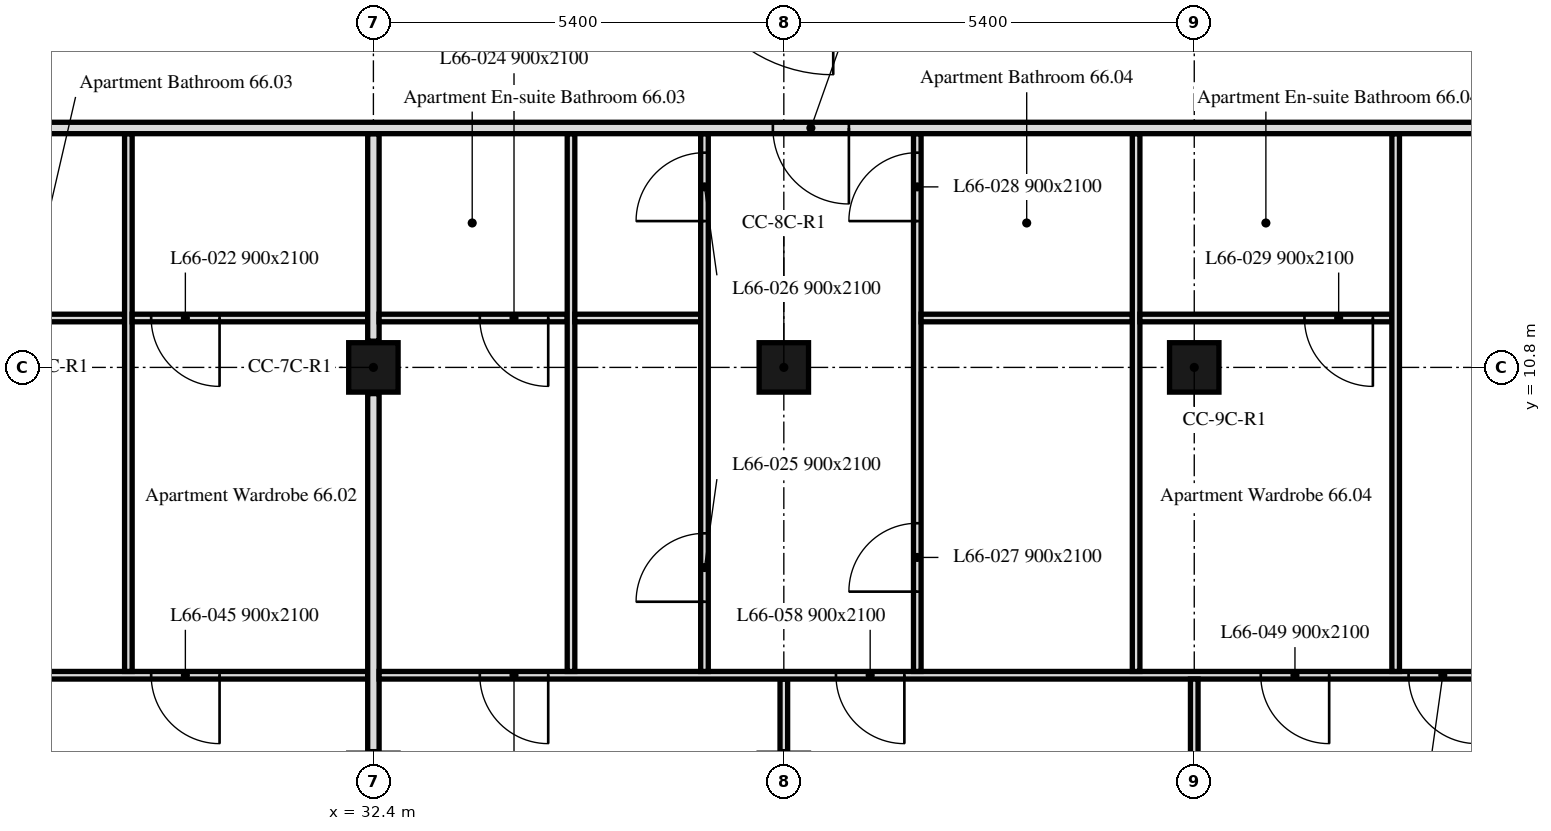
"""IFC4 building model, lengths in metres.
Left out: names, types, materials, properties, quantities, classifications, styles, units other than length and angle.
Written with IfcOpenShell. Run it as: python <this file> out.ifc"""

import sys

from ifc_helpers import new_model, si_unit, direction, frame, frame_2d, origin, origin_2d, place, context, subcontext, project, spatial, rectangle, extrude, element, fill, save


model = new_model("IFC4")
c1 = context("Model", 3, precision=1e-05, world=origin(), true_north=direction((0.0, 1.0)))
c2 = subcontext(c1, "Body", "Model", "MODEL_VIEW")
j1 = project(units=[si_unit("LENGTHUNIT", "METRE"), si_unit("PLANEANGLEUNIT", "RADIAN")], contexts=[c1])
p1 = place(None, origin())
s1 = spatial("IfcSite", under=j1, at=p1, CompositionType="ELEMENT")
p2 = place(p1, origin())
s2 = spatial("IfcBuilding", under=s1, at=p2, CompositionType="ELEMENT")
p3 = place(p2, frame((0.0, 0.0, 271.9)))
s3 = spatial("IfcBuildingStorey", under=s2, at=p3, CompositionType="ELEMENT", Elevation=271.9)
for number, where, z_axis, x_axis in (
    (1, (32.4, 10.8, 0.0), (0.0, 0.0, 1.0), (1.0, 0.0, 0.0)),
    (2, (37.8, 10.8, 0.0), (0.0, 0.0, 1.0), (1.0, 0.0, 0.0)),
    (3, (43.2, 10.8, 0.0), (0.0, 0.0, 1.0), (1.0, 0.0, 0.0)),
):
    element("IfcColumn", number, at=place(p3, frame(where, z_axis=z_axis, x_axis=x_axis)), inside=s3, PredefinedType="COLUMN", context=c2, shape_type="SweptSolid", body=[
        extrude(rectangle(XDim=0.65, YDim=0.65, at=origin_2d()), origin(), (0.0, 0.0, 1.0), 3.0),
    ])
p4 = place(p3, frame((32.325, 6.75, 0.0), z_axis=(0.0, 0.0, 1.0), x_axis=(-1.0, 0.0, 0.0)))
e4 = element("IfcWall", 4, at=p4, inside=s3, PredefinedType="PARTITIONING", context=c2, shape_type="SweptSolid", body=[
    extrude(rectangle(XDim=5.355, YDim=0.1, at=frame_2d((2.677, 0.0))), origin(), (0.0, 0.0, 1.0), 3.0),
])
p5 = place(p4, frame((1.949, 0.0, 0.0)))
e5 = element("IfcOpeningElement", 5, at=p5, cuts=e4, PredefinedType="OPENING", context=c2, shape_type="SweptSolid", body=[
    extrude(rectangle(XDim=0.9, YDim=2.1, at=frame_2d((0.45, 1.05))), frame((0.0, 0.05, 0.0), z_axis=(0.0, -1.0, 0.0), x_axis=(1.0, 0.0, 0.0)), (0.0, 0.0, 1.0), 0.1),
])
p6 = place(p3, frame((29.126, 11.45, 0.0), z_axis=(0.0, 0.0, 1.0), x_axis=(-1.0, 0.0, 0.0)))
e6 = element("IfcWall", 6, at=p6, inside=s3, PredefinedType="PARTITIONING", context=c2, shape_type="SweptSolid", body=[
    extrude(rectangle(XDim=2.056, YDim=0.1, at=frame_2d((1.028, 0.0))), origin(), (0.0, 0.0, 1.0), 3.0),
])
p7 = place(p3, frame((29.176, 6.8, 0.0), z_axis=(0.0, 0.0, 1.0), x_axis=(0.0, 1.0, 0.0)))
e7 = element("IfcWall", 7, at=p7, inside=s3, PredefinedType="PARTITIONING", context=c2, shape_type="SweptSolid", body=[
    extrude(rectangle(XDim=7.075, YDim=0.1, at=frame_2d((3.538, 0.0))), origin(), (0.0, 0.0, 1.0), 3.0),
])
p8 = place(p3, frame((32.4, 5.745, 0.0), z_axis=(0.0, 0.0, 1.0), x_axis=(0.0, 1.0, 0.0)))
e8 = element("IfcWall", 8, at=p8, inside=s3, PredefinedType="PARTITIONING", context=c2, shape_type="SweptSolid", body=[
    extrude(rectangle(XDim=4.71, YDim=0.15, at=frame_2d((2.355, 0.0))), origin(), (0.0, 0.0, 1.0), 2.4),
])
p9 = place(p3, frame((32.325, 11.45, 0.0), z_axis=(0.0, 0.0, 1.0), x_axis=(-1.0, 0.0, 0.0)))
e9 = element("IfcWall", 9, at=p9, inside=s3, PredefinedType="PARTITIONING", context=c2, shape_type="SweptSolid", body=[
    extrude(rectangle(XDim=3.099, YDim=0.1, at=frame_2d((1.549, 0.0))), origin(), (0.0, 0.0, 1.0), 3.0),
])
p10 = place(p9, frame((1.949, 0.0, 0.0)))
e10 = element("IfcOpeningElement", 10, at=p10, cuts=e9, PredefinedType="OPENING", context=c2, shape_type="SweptSolid", body=[
    extrude(rectangle(XDim=0.9, YDim=2.1, at=frame_2d((0.45, 1.05))), frame((0.0, 0.05, 0.0), z_axis=(0.0, -1.0, 0.0), x_axis=(1.0, 0.0, 0.0)), (0.0, 0.0, 1.0), 0.1),
])
p11 = place(p3, frame((32.4, 11.145, 0.0), z_axis=(0.0, 0.0, 1.0), x_axis=(0.0, 1.0, 0.0)))
e11 = element("IfcWall", 11, at=p11, inside=s3, PredefinedType="PARTITIONING", context=c2, shape_type="SweptSolid", body=[
    extrude(rectangle(XDim=2.73, YDim=0.15, at=frame_2d((1.365, 0.0))), origin(), (0.0, 0.0, 1.0), 2.4),
])
p12 = place(p3, frame((37.8, 5.745, 0.0), z_axis=(0.0, 0.0, 1.0), x_axis=(0.0, 1.0, 0.0)))
e12 = element("IfcWall", 12, at=p12, inside=s3, PredefinedType="PARTITIONING", context=c2, shape_type="SweptSolid", body=[
    extrude(rectangle(XDim=0.955, YDim=0.1, at=frame_2d((0.478, 0.0))), origin(), (0.0, 0.0, 1.0), 2.4),
])
p13 = place(p3, frame((47.849, 6.75, 0.0), z_axis=(0.0, 0.0, 1.0), x_axis=(-1.0, 0.0, 0.0)))
e13 = element("IfcWall", 13, at=p13, inside=s3, PredefinedType="PARTITIONING", context=c2, shape_type="SweptSolid", body=[
    extrude(rectangle(XDim=15.374, YDim=0.1, at=frame_2d((7.687, 0.0))), origin(), (0.0, 0.0, 1.0), 2.4),
])
p14 = place(p13, frame((0.929, 0.0, 0.0)))
e14 = element("IfcOpeningElement", 14, at=p14, cuts=e13, PredefinedType="OPENING", context=c2, shape_type="SweptSolid", body=[
    extrude(rectangle(XDim=0.9, YDim=2.1, at=frame_2d((0.45, 1.05))), frame((0.0, 0.05, 0.0), z_axis=(0.0, -1.0, 0.0), x_axis=(1.0, 0.0, 0.0)), (0.0, 0.0, 1.0), 0.1),
])
p15 = place(p13, frame((13.149, 0.0, 0.0)))
e15 = element("IfcOpeningElement", 15, at=p15, cuts=e13, PredefinedType="OPENING", context=c2, shape_type="SweptSolid", body=[
    extrude(rectangle(XDim=0.9, YDim=2.1, at=frame_2d((0.45, 1.05))), frame((0.0, 0.05, 0.0), z_axis=(0.0, -1.0, 0.0), x_axis=(1.0, 0.0, 0.0)), (0.0, 0.0, 1.0), 0.1),
])
p16 = place(p13, frame((2.874, 0.0, 0.0)))
e16 = element("IfcOpeningElement", 16, at=p16, cuts=e13, PredefinedType="OPENING", context=c2, shape_type="SweptSolid", body=[
    extrude(rectangle(XDim=0.9, YDim=2.1, at=frame_2d((0.45, 1.05))), frame((0.0, 0.05, 0.0), z_axis=(0.0, -1.0, 0.0), x_axis=(1.0, 0.0, 0.0)), (0.0, 0.0, 1.0), 0.1),
])
p17 = place(p13, frame((8.463, 0.0, 0.0)))
e17 = element("IfcOpeningElement", 17, at=p17, cuts=e13, PredefinedType="OPENING", context=c2, shape_type="SweptSolid", body=[
    extrude(rectangle(XDim=0.9, YDim=2.1, at=frame_2d((0.45, 1.05))), frame((0.0, 0.05, 0.0), z_axis=(0.0, -1.0, 0.0), x_axis=(1.0, 0.0, 0.0)), (0.0, 0.0, 1.0), 0.1),
])
p18 = place(p3, frame((43.2, 1.112, 0.0), z_axis=(0.0, 0.0, 1.0), x_axis=(0.0, 1.0, 0.0)))
e18 = element("IfcWall", 18, at=p18, inside=s3, PredefinedType="PARTITIONING", context=c2, shape_type="SweptSolid", body=[
    extrude(rectangle(XDim=5.588, YDim=0.1, at=frame_2d((2.794, 0.0))), origin(), (0.0, 0.0, 1.0), 3.0),
])
p19 = place(p18, frame((1.813, 0.0, 0.0)))
e19 = element("IfcOpeningElement", 19, at=p19, cuts=e18, PredefinedType="OPENING", context=c2, shape_type="SweptSolid", body=[
    extrude(rectangle(XDim=0.9, YDim=2.1, at=frame_2d((0.45, 1.05))), frame((0.0, 0.05, 0.0), z_axis=(0.0, -1.0, 0.0), x_axis=(1.0, 0.0, 0.0)), (0.0, 0.0, 1.0), 0.1),
])
p20 = place(p3, frame((34.95, 11.45, 0.0), z_axis=(0.0, 0.0, 1.0), x_axis=(-1.0, 0.0, 0.0)))
e20 = element("IfcWall", 20, at=p20, inside=s3, PredefinedType="PARTITIONING", context=c2, shape_type="SweptSolid", body=[
    extrude(rectangle(XDim=2.475, YDim=0.1, at=frame_2d((1.237, 0.0))), origin(), (0.0, 0.0, 1.0), 3.0),
])
p21 = place(p20, frame((0.25, 0.0, 0.0)))
e21 = element("IfcOpeningElement", 21, at=p21, cuts=e20, PredefinedType="OPENING", context=c2, shape_type="SweptSolid", body=[
    extrude(rectangle(XDim=0.9, YDim=2.1, at=frame_2d((0.45, 1.05))), frame((0.0, 0.05, 0.0), z_axis=(0.0, -1.0, 0.0), x_axis=(1.0, 0.0, 0.0)), (0.0, 0.0, 1.0), 0.1),
])
p22 = place(p3, frame((35.0, 6.8, 0.0), z_axis=(0.0, 0.0, 1.0), x_axis=(0.0, 1.0, 0.0)))
e22 = element("IfcWall", 22, at=p22, inside=s3, PredefinedType="PARTITIONING", context=c2, shape_type="SweptSolid", body=[
    extrude(rectangle(XDim=7.075, YDim=0.1, at=frame_2d((3.538, 0.0))), origin(), (0.0, 0.0, 1.0), 2.4),
])
p23 = place(p3, frame((36.706, 11.45, 0.0), z_axis=(0.0, 0.0, 1.0), x_axis=(-1.0, 0.0, 0.0)))
e23 = element("IfcWall", 23, at=p23, inside=s3, PredefinedType="PARTITIONING", context=c2, shape_type="SweptSolid", body=[
    extrude(rectangle(XDim=1.656, YDim=0.1, at=frame_2d((0.828, 0.0))), origin(), (0.0, 0.0, 1.0), 3.0),
])
p24 = place(p3, frame((36.756, 6.8, 0.0), z_axis=(0.0, 0.0, 1.0), x_axis=(0.0, 1.0, 0.0)))
e24 = element("IfcWall", 24, at=p24, inside=s3, PredefinedType="PARTITIONING", context=c2, shape_type="SweptSolid", body=[
    extrude(rectangle(XDim=7.075, YDim=0.1, at=frame_2d((3.538, 0.0))), origin(), (0.0, 0.0, 1.0), 2.4),
])
p25 = place(p24, frame((0.917, 0.0, 0.0)))
e25 = element("IfcOpeningElement", 25, at=p25, cuts=e24, PredefinedType="OPENING", context=c2, shape_type="SweptSolid", body=[
    extrude(rectangle(XDim=0.9, YDim=2.1, at=frame_2d((0.45, 1.05))), frame((0.0, 0.05, 0.0), z_axis=(0.0, -1.0, 0.0), x_axis=(1.0, 0.0, 0.0)), (0.0, 0.0, 1.0), 0.1),
])
p26 = place(p24, frame((5.925, 0.0, 0.0)))
e26 = element("IfcOpeningElement", 26, at=p26, cuts=e24, PredefinedType="OPENING", context=c2, shape_type="SweptSolid", body=[
    extrude(rectangle(XDim=0.9, YDim=2.1, at=frame_2d((0.45, 1.05))), frame((0.0, 0.05, 0.0), z_axis=(0.0, -1.0, 0.0), x_axis=(1.0, 0.0, 0.0)), (0.0, 0.0, 1.0), 0.1),
])
p27 = place(p3, frame((39.556, 6.8, 0.0), z_axis=(0.0, 0.0, 1.0), x_axis=(0.0, 1.0, 0.0)))
e27 = element("IfcWall", 27, at=p27, inside=s3, PredefinedType="PARTITIONING", context=c2, shape_type="SweptSolid", body=[
    extrude(rectangle(XDim=7.075, YDim=0.1, at=frame_2d((3.538, 0.0))), origin(), (0.0, 0.0, 1.0), 2.4),
])
p28 = place(p27, frame((1.05, 0.0, 0.0)))
e28 = element("IfcOpeningElement", 28, at=p28, cuts=e27, PredefinedType="OPENING", context=c2, shape_type="SweptSolid", body=[
    extrude(rectangle(XDim=0.9, YDim=2.1, at=frame_2d((0.45, 1.05))), frame((0.0, 0.05, 0.0), z_axis=(0.0, -1.0, 0.0), x_axis=(1.0, 0.0, 0.0)), (0.0, 0.0, 1.0), 0.1),
])
p29 = place(p27, frame((5.925, 0.0, 0.0)))
e29 = element("IfcOpeningElement", 29, at=p29, cuts=e27, PredefinedType="OPENING", context=c2, shape_type="SweptSolid", body=[
    extrude(rectangle(XDim=0.9, YDim=2.1, at=frame_2d((0.45, 1.05))), frame((0.0, 0.05, 0.0), z_axis=(0.0, -1.0, 0.0), x_axis=(1.0, 0.0, 0.0)), (0.0, 0.0, 1.0), 0.1),
])
p30 = place(p3, frame((42.385, 11.45, 0.0), z_axis=(0.0, 0.0, 1.0), x_axis=(-1.0, 0.0, 0.0)))
e30 = element("IfcWall", 30, at=p30, inside=s3, PredefinedType="PARTITIONING", context=c2, shape_type="SweptSolid", body=[
    extrude(rectangle(XDim=2.779, YDim=0.1, at=frame_2d((1.39, 0.0))), origin(), (0.0, 0.0, 1.0), 3.0),
])
p31 = place(p3, frame((42.435, 6.8, 0.0), z_axis=(0.0, 0.0, 1.0), x_axis=(0.0, 1.0, 0.0)))
e31 = element("IfcWall", 31, at=p31, inside=s3, PredefinedType="PARTITIONING", context=c2, shape_type="SweptSolid", body=[
    extrude(rectangle(XDim=7.075, YDim=0.1, at=frame_2d((3.538, 0.0))), origin(), (0.0, 0.0, 1.0), 2.4),
])
p32 = place(p3, frame((45.8, 11.45, 0.0), z_axis=(0.0, 0.0, 1.0), x_axis=(-1.0, 0.0, 0.0)))
e32 = element("IfcWall", 32, at=p32, inside=s3, PredefinedType="PARTITIONING", context=c2, shape_type="SweptSolid", body=[
    extrude(rectangle(XDim=3.315, YDim=0.1, at=frame_2d((1.657, 0.0))), origin(), (0.0, 0.0, 1.0), 3.0),
])
p33 = place(p32, frame((0.25, 0.0, 0.0)))
e33 = element("IfcOpeningElement", 33, at=p33, cuts=e32, PredefinedType="OPENING", context=c2, shape_type="SweptSolid", body=[
    extrude(rectangle(XDim=0.9, YDim=2.1, at=frame_2d((0.45, 1.05))), frame((0.0, 0.05, 0.0), z_axis=(0.0, -1.0, 0.0), x_axis=(1.0, 0.0, 0.0)), (0.0, 0.0, 1.0), 0.1),
])
p34 = place(p3, frame((45.85, 6.8, 0.0), z_axis=(0.0, 0.0, 1.0), x_axis=(0.0, 1.0, 0.0)))
e34 = element("IfcWall", 34, at=p34, inside=s3, PredefinedType="PARTITIONING", context=c2, shape_type="SweptSolid", body=[
    extrude(rectangle(XDim=7.075, YDim=0.1, at=frame_2d((3.538, 0.0))), origin(), (0.0, 0.0, 1.0), 2.4),
])
p35 = place(p3, frame((47.849, 13.95, 0.0), z_axis=(0.0, 0.0, 1.0), x_axis=(-1.0, 0.0, 0.0)))
e35 = element("IfcWall", 35, at=p35, inside=s3, PredefinedType="PARTITIONING", context=c2, shape_type="SweptSolid", body=[
    extrude(rectangle(XDim=41.698, YDim=0.15, at=frame_2d((20.849, 0.0))), origin(), (0.0, 0.0, 1.0), 2.4),
])
p36 = place(p35, frame((37.749, 0.0, 0.0)))
e36 = element("IfcOpeningElement", 36, at=p36, cuts=e35, PredefinedType="OPENING", context=c2, shape_type="SweptSolid", body=[
    extrude(rectangle(XDim=1.0, YDim=2.1, at=frame_2d((0.5, 1.05))), frame((0.0, 0.075, 0.0), z_axis=(0.0, -1.0, 0.0), x_axis=(1.0, 0.0, 0.0)), (0.0, 0.0, 1.0), 0.15),
])
p37 = place(p35, frame((32.962, 0.0, 0.0)))
e37 = element("IfcOpeningElement", 37, at=p37, cuts=e35, PredefinedType="OPENING", context=c2, shape_type="SweptSolid", body=[
    extrude(rectangle(XDim=1.0, YDim=2.1, at=frame_2d((0.5, 1.05))), frame((0.0, 0.075, 0.0), z_axis=(0.0, -1.0, 0.0), x_axis=(1.0, 0.0, 0.0)), (0.0, 0.0, 1.0), 0.15),
])
p38 = place(p35, frame((22.179, 0.0, 0.0)))
e38 = element("IfcOpeningElement", 38, at=p38, cuts=e35, PredefinedType="OPENING", context=c2, shape_type="SweptSolid", body=[
    extrude(rectangle(XDim=1.0, YDim=2.1, at=frame_2d((0.5, 1.05))), frame((0.0, 0.075, 0.0), z_axis=(0.0, -1.0, 0.0), x_axis=(1.0, 0.0, 0.0)), (0.0, 0.0, 1.0), 0.15),
])
p39 = place(p35, frame((9.193, 0.0, 0.0)))
e39 = element("IfcOpeningElement", 39, at=p39, cuts=e35, PredefinedType="OPENING", context=c2, shape_type="SweptSolid", body=[
    extrude(rectangle(XDim=1.0, YDim=2.1, at=frame_2d((0.5, 1.05))), frame((0.0, 0.075, 0.0), z_axis=(0.0, -1.0, 0.0), x_axis=(1.0, 0.0, 0.0)), (0.0, 0.0, 1.0), 0.15),
])
p40 = place(p10, origin())
e40 = element("IfcDoor", 40, at=p40, inside=s3, OperationType="SINGLE_SWING_LEFT", PredefinedType="DOOR", context=c2, shape_type="SweptSolid", body=[
    extrude(rectangle(XDim=0.9, YDim=2.1, at=frame_2d((0.45, 1.05))), frame((0.0, 0.025, 0.0), z_axis=(0.0, -1.0, 0.0), x_axis=(1.0, 0.0, 0.0)), (0.0, 0.0, 1.0), 0.05),
])
fill(e10, e40)
p41 = place(p14, origin())
e41 = element("IfcDoor", 41, at=p41, inside=s3, OperationType="SINGLE_SWING_LEFT", PredefinedType="DOOR", context=c2, shape_type="SweptSolid", body=[
    extrude(rectangle(XDim=0.9, YDim=2.1, at=frame_2d((0.45, 1.05))), frame((0.0, 0.025, 0.0), z_axis=(0.0, -1.0, 0.0), x_axis=(1.0, 0.0, 0.0)), (0.0, 0.0, 1.0), 0.05),
])
fill(e14, e41)
p42 = place(p21, origin())
e42 = element("IfcDoor", 42, at=p42, inside=s3, OperationType="SINGLE_SWING_LEFT", PredefinedType="DOOR", context=c2, shape_type="SweptSolid", body=[
    extrude(rectangle(XDim=0.9, YDim=2.1, at=frame_2d((0.45, 1.05))), frame((0.0, 0.025, 0.0), z_axis=(0.0, -1.0, 0.0), x_axis=(1.0, 0.0, 0.0)), (0.0, 0.0, 1.0), 0.05),
])
fill(e21, e42)
p43 = place(p25, origin())
e43 = element("IfcDoor", 43, at=p43, inside=s3, OperationType="SINGLE_SWING_RIGHT", PredefinedType="DOOR", context=c2, shape_type="SweptSolid", body=[
    extrude(rectangle(XDim=0.9, YDim=2.1, at=frame_2d((0.45, 1.05))), frame((0.0, 0.025, 0.0), z_axis=(0.0, -1.0, 0.0), x_axis=(1.0, 0.0, 0.0)), (0.0, 0.0, 1.0), 0.05),
])
fill(e25, e43)
p44 = place(p26, origin())
e44 = element("IfcDoor", 44, at=p44, inside=s3, OperationType="SINGLE_SWING_LEFT", PredefinedType="DOOR", context=c2, shape_type="SweptSolid", body=[
    extrude(rectangle(XDim=0.9, YDim=2.1, at=frame_2d((0.45, 1.05))), frame((0.0, 0.025, 0.0), z_axis=(0.0, -1.0, 0.0), x_axis=(1.0, 0.0, 0.0)), (0.0, 0.0, 1.0), 0.05),
])
fill(e26, e44)
p45 = place(p28, origin())
e45 = element("IfcDoor", 45, at=p45, inside=s3, OperationType="SINGLE_SWING_LEFT", PredefinedType="DOOR", context=c2, shape_type="SweptSolid", body=[
    extrude(rectangle(XDim=0.9, YDim=2.1, at=frame_2d((0.45, 1.05))), frame((0.0, 0.025, 0.0), z_axis=(0.0, -1.0, 0.0), x_axis=(1.0, 0.0, 0.0)), (0.0, 0.0, 1.0), 0.05),
])
fill(e28, e45)
p46 = place(p29, origin())
e46 = element("IfcDoor", 46, at=p46, inside=s3, OperationType="SINGLE_SWING_LEFT", PredefinedType="DOOR", context=c2, shape_type="SweptSolid", body=[
    extrude(rectangle(XDim=0.9, YDim=2.1, at=frame_2d((0.45, 1.05))), frame((0.0, 0.025, 0.0), z_axis=(0.0, -1.0, 0.0), x_axis=(1.0, 0.0, 0.0)), (0.0, 0.0, 1.0), 0.05),
])
fill(e29, e46)
p47 = place(p33, origin())
e47 = element("IfcDoor", 47, at=p47, inside=s3, OperationType="SINGLE_SWING_LEFT", PredefinedType="DOOR", context=c2, shape_type="SweptSolid", body=[
    extrude(rectangle(XDim=0.9, YDim=2.1, at=frame_2d((0.45, 1.05))), frame((0.0, 0.025, 0.0), z_axis=(0.0, -1.0, 0.0), x_axis=(1.0, 0.0, 0.0)), (0.0, 0.0, 1.0), 0.05),
])
fill(e33, e47)
p48 = place(p5, origin())
e48 = element("IfcDoor", 48, at=p48, inside=s3, OperationType="SINGLE_SWING_LEFT", PredefinedType="DOOR", context=c2, shape_type="SweptSolid", body=[
    extrude(rectangle(XDim=0.9, YDim=2.1, at=frame_2d((0.45, 1.05))), frame((0.0, 0.025, 0.0), z_axis=(0.0, -1.0, 0.0), x_axis=(1.0, 0.0, 0.0)), (0.0, 0.0, 1.0), 0.05),
])
fill(e5, e48)
p49 = place(p15, origin())
e49 = element("IfcDoor", 49, at=p49, inside=s3, OperationType="SINGLE_SWING_LEFT", PredefinedType="DOOR", context=c2, shape_type="SweptSolid", body=[
    extrude(rectangle(XDim=0.9, YDim=2.1, at=frame_2d((0.45, 1.05))), frame((0.0, 0.025, 0.0), z_axis=(0.0, -1.0, 0.0), x_axis=(1.0, 0.0, 0.0)), (0.0, 0.0, 1.0), 0.05),
])
fill(e15, e49)
p50 = place(p16, origin())
e50 = element("IfcDoor", 50, at=p50, inside=s3, OperationType="SINGLE_SWING_RIGHT", PredefinedType="DOOR", context=c2, shape_type="SweptSolid", body=[
    extrude(rectangle(XDim=0.9, YDim=2.1, at=frame_2d((0.45, 1.05))), frame((0.0, 0.025, 0.0), z_axis=(0.0, -1.0, 0.0), x_axis=(1.0, 0.0, 0.0)), (0.0, 0.0, 1.0), 0.05),
])
fill(e16, e50)
p51 = place(p17, origin())
e51 = element("IfcDoor", 51, at=p51, inside=s3, OperationType="SINGLE_SWING_LEFT", PredefinedType="DOOR", context=c2, shape_type="SweptSolid", body=[
    extrude(rectangle(XDim=0.9, YDim=2.1, at=frame_2d((0.45, 1.05))), frame((0.0, 0.025, 0.0), z_axis=(0.0, -1.0, 0.0), x_axis=(1.0, 0.0, 0.0)), (0.0, 0.0, 1.0), 0.05),
])
fill(e17, e51)
p52 = place(p39, origin())
e52 = element("IfcDoor", 52, at=p52, inside=s3, OperationType="SINGLE_SWING_LEFT", PredefinedType="DOOR", context=c2, shape_type="SweptSolid", body=[
    extrude(rectangle(XDim=1.0, YDim=2.1, at=frame_2d((0.5, 1.05))), frame((0.0, 0.025, 0.0), z_axis=(0.0, -1.0, 0.0), x_axis=(1.0, 0.0, 0.0)), (0.0, 0.0, 1.0), 0.05),
])
fill(e39, e52)
save(model, sys.argv[1])
